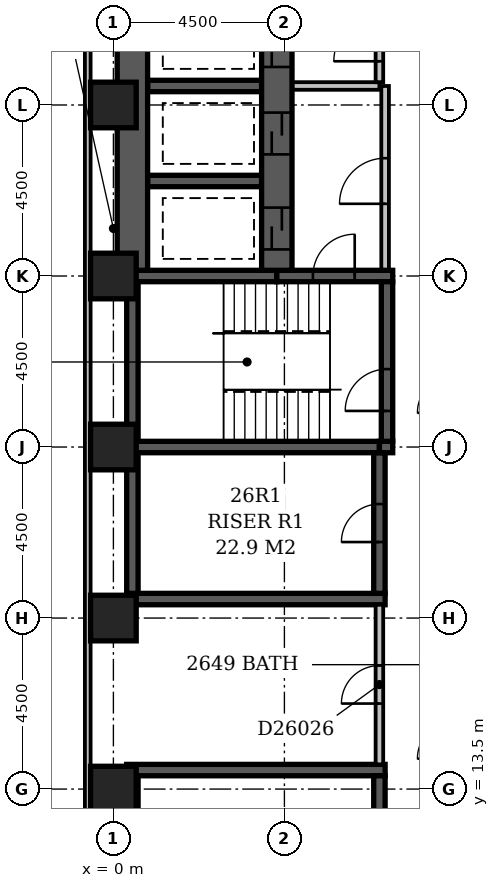
"""IFC4 building model, lengths in metres.
Left out: names, types, materials, properties, quantities, classifications, styles, units other than length and angle.
Written with IfcOpenShell. Run it as: python <this file> out.ifc"""

import sys

from ifc_helpers import new_model, si_unit, direction, frame, frame_2d, origin, origin_2d, place, context, subcontext, project, spatial, rectangle, extrude, element, fill, save


model = new_model("IFC4")
c1 = context("Model", 3, precision=1e-05, world=origin(), true_north=direction((0.0, 1.0)))
c2 = subcontext(c1, "Body", "Model", "MODEL_VIEW")
j1 = project(units=[si_unit("LENGTHUNIT", "METRE"), si_unit("PLANEANGLEUNIT", "RADIAN")], contexts=[c1])
p1 = place(None, origin())
s1 = spatial("IfcSite", under=j1, at=p1, CompositionType="ELEMENT")
p2 = place(p1, origin())
s2 = spatial("IfcBuilding", under=s1, at=p2, CompositionType="ELEMENT")
p3 = place(p2, frame((0.0, 0.0, 104.6)))
s3 = spatial("IfcBuildingStorey", under=s2, at=p3, CompositionType="ELEMENT", Elevation=104.6)
for number, where, z_axis, x_axis in (
    (1, (0.35, 14.0, -0.3), (0.0, 0.0, 1.0), (1.0, 0.0, 0.0)),
    (2, (0.35, 18.5, -0.3), (0.0, 0.0, 1.0), (1.0, 0.0, 0.0)),
):
    element("IfcWall", number, at=place(p3, frame(where, z_axis=z_axis, x_axis=x_axis)), inside=s3, PredefinedType="SHEAR", context=c2, shape_type="SweptSolid", body=[
        extrude(rectangle(XDim=6.8, YDim=0.3, at=frame_2d((3.4, 0.0))), origin(), (0.0, 0.0, 1.0), 3.45),
    ])
p4 = place(p3, frame((0.35, 22.5, -0.3), z_axis=(0.0, 0.0, 1.0), x_axis=(1.0, 0.0, 0.0)))
e3 = element("IfcWall", 3, at=p4, inside=s3, PredefinedType="SHEAR", context=c2, shape_type="SweptSolid", body=[
    extrude(rectangle(XDim=6.65, YDim=0.3, at=frame_2d((3.325, 0.0))), origin(), (0.0, 0.0, 1.0), 3.45),
])
p5 = place(p3, frame((0.35, 27.0, -0.3), z_axis=(0.0, 0.0, 1.0), x_axis=(1.0, 0.0, 0.0)))
e4 = element("IfcWall", 4, at=p5, inside=s3, PredefinedType="SHEAR", context=c2, shape_type="SweptSolid", body=[
    extrude(rectangle(XDim=3.95, YDim=0.3, at=frame_2d((1.975, 0.0))), origin(), (0.0, 0.0, 1.0), 3.45),
])
for number, where, z_axis, x_axis in (
    (5, (0.5, 10.15, -0.3), (0.0, 0.0, 1.0), (0.0, 1.0, 0.0)),
    (6, (0.5, 18.65, -0.3), (0.0, 0.0, 1.0), (0.0, 1.0, 0.0)),
):
    element("IfcWall", number, at=place(p3, frame(where, z_axis=z_axis, x_axis=x_axis)), inside=s3, PredefinedType="SHEAR", context=c2, shape_type="SweptSolid", body=[
        extrude(rectangle(XDim=3.7, YDim=0.3, at=frame_2d((1.85, 0.0))), origin(), (0.0, 0.0, 1.0), 3.45),
    ])
p6 = place(p3, frame((0.5, 22.65, -0.3), z_axis=(0.0, 0.0, 1.0), x_axis=(0.0, 1.0, 0.0)))
e7 = element("IfcWall", 7, at=p6, inside=s3, PredefinedType="SHEAR", context=c2, shape_type="SweptSolid", body=[
    extrude(rectangle(XDim=4.2, YDim=0.3, at=frame_2d((2.1, 0.0))), origin(), (0.0, 0.0, 1.0), 3.45),
])
p7 = place(p3, frame((0.5, 27.15, -0.3), z_axis=(0.0, 0.0, 1.0), x_axis=(0.0, 1.0, 0.0)))
e8 = element("IfcWall", 8, at=p7, inside=s3, PredefinedType="SHEAR", context=c2, shape_type="SweptSolid", body=[
    extrude(rectangle(XDim=6.95, YDim=0.8, at=frame_2d((3.475, 0.0))), origin(), (0.0, 0.0, 1.0), 3.45),
])
for number, where, z_axis, x_axis in (
    (9, (0.9, 29.5, -0.3), (0.0, 0.0, 1.0), (1.0, 0.0, 0.0)),
    (10, (0.9, 32.0, -0.3), (0.0, 0.0, 1.0), (1.0, 0.0, 0.0)),
):
    element("IfcWall", number, at=place(p3, frame(where, z_axis=z_axis, x_axis=x_axis)), inside=s3, PredefinedType="SHEAR", context=c2, shape_type="SweptSolid", body=[
        extrude(rectangle(XDim=3.0, YDim=0.3, at=frame_2d((1.5, 0.0))), origin(), (0.0, 0.0, 1.0), 3.45),
    ])
p8 = place(p3, frame((4.3, 27.0, -0.3), z_axis=(0.0, 0.0, 1.0), x_axis=(1.0, 0.0, 0.0)))
e11 = element("IfcWall", 11, at=p8, inside=s3, PredefinedType="SHEAR", context=c2, shape_type="SweptSolid", body=[
    extrude(rectangle(XDim=3.05, YDim=0.3, at=frame_2d((1.525, 0.0))), origin(), (0.0, 0.0, 1.0), 3.45),
])
p9 = place(p8, frame((0.95, 0.0, 0.3)))
e12 = element("IfcOpeningElement", 12, at=p9, cuts=e11, PredefinedType="OPENING", context=c2, shape_type="SweptSolid", body=[
    extrude(rectangle(XDim=1.1, YDim=2.1, at=frame_2d((0.55, 1.05))), frame((0.0, 0.162, 0.0), z_axis=(0.0, -1.0, 0.0), x_axis=(1.0, 0.0, 0.0)), (0.0, 0.0, 1.0), 0.324),
])
p10 = place(p3, frame((4.3, 27.15, -0.3), z_axis=(0.0, 0.0, 1.0), x_axis=(0.0, 1.0, 0.0)))
e13 = element("IfcWall", 13, at=p10, inside=s3, PredefinedType="SHEAR", context=c2, shape_type="SweptSolid", body=[
    extrude(rectangle(XDim=6.95, YDim=0.8, at=frame_2d((3.475, 0.0))), origin(), (0.0, 0.0, 1.0), 3.45),
])
p11 = place(p10, frame((3.05, 0.0, 0.3)))
e14 = element("IfcOpeningElement", 14, at=p11, cuts=e13, PredefinedType="OPENING", context=c2, shape_type="SweptSolid", body=[
    extrude(rectangle(XDim=1.1, YDim=2.1, at=frame_2d((0.55, 1.05))), frame((0.0, 0.412, 0.0), z_axis=(0.0, -1.0, 0.0), x_axis=(1.0, 0.0, 0.0)), (0.0, 0.0, 1.0), 0.824),
])
p12 = place(p10, frame((0.55, 0.0, 0.3)))
e15 = element("IfcOpeningElement", 15, at=p12, cuts=e13, PredefinedType="OPENING", context=c2, shape_type="SweptSolid", body=[
    extrude(rectangle(XDim=1.1, YDim=2.1, at=frame_2d((0.55, 1.05))), frame((0.0, 0.412, 0.0), z_axis=(0.0, -1.0, 0.0), x_axis=(1.0, 0.0, 0.0)), (0.0, 0.0, 1.0), 0.824),
])
p13 = place(p10, frame((5.35, 0.0, 0.3)))
e16 = element("IfcOpeningElement", 16, at=p13, cuts=e13, PredefinedType="OPENING", context=c2, shape_type="SweptSolid", body=[
    extrude(rectangle(XDim=1.1, YDim=2.1, at=frame_2d((0.55, 1.05))), frame((0.0, 0.412, 0.0), z_axis=(0.0, -1.0, 0.0), x_axis=(1.0, 0.0, 0.0)), (0.0, 0.0, 1.0), 0.824),
])
p14 = place(p3, frame((7.0, 10.15, -0.3), z_axis=(0.0, 0.0, 1.0), x_axis=(0.0, 1.0, 0.0)))
e17 = element("IfcWall", 17, at=p14, inside=s3, PredefinedType="SHEAR", context=c2, shape_type="SweptSolid", body=[
    extrude(rectangle(XDim=3.7, YDim=0.3, at=frame_2d((1.85, 0.0))), origin(), (0.0, 0.0, 1.0), 3.45),
])
p15 = place(p14, frame((1.35, 0.0, 0.3)))
e18 = element("IfcOpeningElement", 18, at=p15, cuts=e17, PredefinedType="OPENING", context=c2, shape_type="SweptSolid", body=[
    extrude(rectangle(XDim=1.0, YDim=2.1, at=frame_2d((0.5, 1.05))), frame((0.0, 0.162, 0.0), z_axis=(0.0, -1.0, 0.0), x_axis=(1.0, 0.0, 0.0)), (0.0, 0.0, 1.0), 0.324),
])
p16 = place(p3, frame((7.0, 18.65, -0.3), z_axis=(0.0, 0.0, 1.0), x_axis=(0.0, 1.0, 0.0)))
e19 = element("IfcWall", 19, at=p16, inside=s3, PredefinedType="SHEAR", context=c2, shape_type="SweptSolid", body=[
    extrude(rectangle(XDim=3.7, YDim=0.3, at=frame_2d((1.85, 0.0))), origin(), (0.0, 0.0, 1.0), 3.45),
])
p17 = place(p16, frame((1.35, 0.0, 0.3)))
e20 = element("IfcOpeningElement", 20, at=p17, cuts=e19, PredefinedType="OPENING", context=c2, shape_type="SweptSolid", body=[
    extrude(rectangle(XDim=1.0, YDim=2.1, at=frame_2d((0.5, 1.05))), frame((0.0, 0.162, 0.0), z_axis=(0.0, -1.0, 0.0), x_axis=(1.0, 0.0, 0.0)), (0.0, 0.0, 1.0), 0.324),
])
p18 = place(p3, frame((7.0, 22.5, -0.3), z_axis=(0.0, 0.0, 1.0), x_axis=(1.0, 0.0, 0.0)))
e21 = element("IfcWall", 21, at=p18, inside=s3, PredefinedType="SHEAR", context=c2, shape_type="SweptSolid", body=[
    extrude(rectangle(XDim=0.35, YDim=0.3, at=frame_2d((0.175, 0.0))), origin(), (0.0, 0.0, 1.0), 3.45),
])
p19 = place(p3, frame((7.2, 22.65, -0.3), z_axis=(0.0, 0.0, 1.0), x_axis=(0.0, 1.0, 0.0)))
e22 = element("IfcWall", 22, at=p19, inside=s3, PredefinedType="SHEAR", context=c2, shape_type="SweptSolid", body=[
    extrude(rectangle(XDim=4.2, YDim=0.3, at=frame_2d((2.1, 0.0))), origin(), (0.0, 0.0, 1.0), 3.45),
])
p20 = place(p19, frame((0.8, 0.0, 0.3)))
e23 = element("IfcOpeningElement", 23, at=p20, cuts=e22, PredefinedType="OPENING", context=c2, shape_type="SweptSolid", body=[
    extrude(rectangle(XDim=1.1, YDim=2.1, at=frame_2d((0.55, 1.05))), frame((0.0, 0.162, 0.0), z_axis=(0.0, -1.0, 0.0), x_axis=(1.0, 0.0, 0.0)), (0.0, 0.0, 1.0), 0.324),
])
for number, where, z_axis, x_axis in (
    (24, (0.0, 13.5, -0.3), (0.0, 0.0, 1.0), (1.0, 0.0, 0.0)),
    (25, (0.0, 18.0, -0.3), (0.0, 0.0, 1.0), (1.0, 0.0, 0.0)),
    (26, (0.0, 22.5, -0.3), (0.0, 0.0, 1.0), (1.0, 0.0, 0.0)),
    (27, (0.0, 27.0, -0.3), (0.0, 0.0, 1.0), (1.0, 0.0, 0.0)),
    (28, (0.0, 31.5, -0.3), (0.0, 0.0, 1.0), (1.0, 0.0, 0.0)),
):
    element("IfcColumn", number, at=place(p3, frame(where, z_axis=z_axis, x_axis=x_axis)), inside=s3, PredefinedType="COLUMN", context=c2, shape_type="SweptSolid", body=[
        extrude(rectangle(XDim=1.2, YDim=1.2, at=origin_2d()), origin(), (0.0, 0.0, 1.0), 3.45),
    ])
p21 = place(p3, frame((-0.675, 59.1, 0.0), z_axis=(0.0, 0.0, 1.0), x_axis=(0.0, -1.0, 0.0)))
e29 = element("IfcWall", 29, at=p21, inside=s3, PredefinedType="STANDARD", context=c2, shape_type="SweptSolid", body=[
    extrude(rectangle(XDim=55.35, YDim=0.15, at=frame_2d((27.675, 0.0))), origin(), (0.0, 0.0, 1.0), 2.5),
])
p22 = place(p21, frame((10.65, 0.0, 0.6)))
e30 = element("IfcOpeningElement", 30, at=p22, cuts=e29, PredefinedType="OPENING", context=c2, shape_type="SweptSolid", body=[
    extrude(rectangle(XDim=2.4, YDim=1.8, at=frame_2d((1.2, 0.9))), frame((0.0, 0.087, 0.0), z_axis=(0.0, -1.0, 0.0), x_axis=(1.0, 0.0, 0.0)), (0.0, 0.0, 1.0), 0.174),
])
p23 = place(p21, frame((15.15, 0.0, 0.6)))
e31 = element("IfcOpeningElement", 31, at=p23, cuts=e29, PredefinedType="OPENING", context=c2, shape_type="SweptSolid", body=[
    extrude(rectangle(XDim=2.4, YDim=1.8, at=frame_2d((1.2, 0.9))), frame((0.0, 0.087, 0.0), z_axis=(0.0, -1.0, 0.0), x_axis=(1.0, 0.0, 0.0)), (0.0, 0.0, 1.0), 0.174),
])
p24 = place(p21, frame((19.434, 0.0, 0.6)))
e32 = element("IfcOpeningElement", 32, at=p24, cuts=e29, PredefinedType="OPENING", context=c2, shape_type="SweptSolid", body=[
    extrude(rectangle(XDim=0.6, YDim=1.8, at=frame_2d((0.3, 0.9))), frame((0.0, 0.087, 0.0), z_axis=(0.0, -1.0, 0.0), x_axis=(1.0, 0.0, 0.0)), (0.0, 0.0, 1.0), 0.174),
])
p25 = place(p21, frame((21.692, 0.0, 0.6)))
e33 = element("IfcOpeningElement", 33, at=p25, cuts=e29, PredefinedType="OPENING", context=c2, shape_type="SweptSolid", body=[
    extrude(rectangle(XDim=0.6, YDim=1.8, at=frame_2d((0.3, 0.9))), frame((0.0, 0.087, 0.0), z_axis=(0.0, -1.0, 0.0), x_axis=(1.0, 0.0, 0.0)), (0.0, 0.0, 1.0), 0.174),
])
p26 = place(p3, frame((4.72, 32.0, 0.0), z_axis=(0.0, 0.0, 1.0), x_axis=(1.0, 0.0, 0.0)))
e34 = element("IfcWall", 34, at=p26, inside=s3, PredefinedType="PARTITIONING", context=c2, shape_type="SweptSolid", body=[
    extrude(rectangle(XDim=2.28, YDim=0.2, at=frame_2d((1.14, 0.0))), origin(), (0.0, 0.0, 1.0), 3.15),
])
p27 = place(p3, frame((7.0, 32.1, 0.0), z_axis=(0.0, 0.0, 1.0), x_axis=(0.0, 1.0, 0.0)))
e35 = element("IfcWall", 35, at=p27, inside=s3, PredefinedType="PARTITIONING", context=c2, shape_type="SweptSolid", body=[
    extrude(rectangle(XDim=2.4, YDim=0.2, at=frame_2d((1.2, 0.0))), origin(), (0.0, 0.0, 1.0), 3.15),
])
p28 = place(p27, frame((0.55, 0.0, 0.0)))
e36 = element("IfcOpeningElement", 36, at=p28, cuts=e35, PredefinedType="OPENING", context=c2, shape_type="SweptSolid", body=[
    extrude(rectangle(XDim=1.2, YDim=2.1, at=frame_2d((0.6, 1.05))), frame((0.0, 0.112, 0.0), z_axis=(0.0, -1.0, 0.0), x_axis=(1.0, 0.0, 0.0)), (0.0, 0.0, 1.0), 0.224),
])
p29 = place(p3, frame((7.15, 27.17, 0.0), z_axis=(0.0, 0.0, 1.0), x_axis=(0.0, 1.0, 0.0)))
e37 = element("IfcWall", 37, at=p29, inside=s3, PredefinedType="PARTITIONING", context=c2, shape_type="SweptSolid", body=[
    extrude(rectangle(XDim=4.83, YDim=0.2, at=frame_2d((2.415, 0.0))), origin(), (0.0, 0.0, 1.0), 3.15),
])
p30 = place(p29, frame((1.73, 0.0, 0.0)))
e38 = element("IfcOpeningElement", 38, at=p30, cuts=e37, PredefinedType="OPENING", context=c2, shape_type="SweptSolid", body=[
    extrude(rectangle(XDim=1.2, YDim=2.1, at=frame_2d((0.6, 1.05))), frame((0.0, 0.112, 0.0), z_axis=(0.0, -1.0, 0.0), x_axis=(1.0, 0.0, 0.0)), (0.0, 0.0, 1.0), 0.224),
])
p31 = place(p3, frame((7.0, 14.15, 0.0), z_axis=(0.0, 0.0, 1.0), x_axis=(0.0, 1.0, 0.0)))
e39 = element("IfcWall", 39, at=p31, inside=s3, PredefinedType="PARTITIONING", context=c2, shape_type="SweptSolid", body=[
    extrude(rectangle(XDim=4.2, YDim=0.2, at=frame_2d((2.1, 0.0))), origin(), (0.0, 0.0, 1.0), 3.15),
])
p32 = place(p31, frame((1.6, 0.0, 0.0)))
e40 = element("IfcOpeningElement", 40, at=p32, cuts=e39, PredefinedType="OPENING", context=c2, shape_type="SweptSolid", body=[
    extrude(rectangle(XDim=1.0, YDim=2.1, at=frame_2d((0.5, 1.05))), frame((0.0, 0.112, 0.0), z_axis=(0.0, -1.0, 0.0), x_axis=(1.0, 0.0, 0.0)), (0.0, 0.0, 1.0), 0.224),
])
p33 = place(p30, origin())
e41 = element("IfcDoor", 41, at=p33, inside=s3, OperationType="SINGLE_SWING_LEFT", PredefinedType="DOOR", context=c2, shape_type="SweptSolid", body=[
    extrude(rectangle(XDim=1.2, YDim=2.1, at=frame_2d((0.6, 1.05))), frame((0.0, 0.025, 0.0), z_axis=(0.0, -1.0, 0.0), x_axis=(1.0, 0.0, 0.0)), (0.0, 0.0, 1.0), 0.05),
])
fill(e38, e41)
p34 = place(p11, origin())
e42 = element("IfcDoor", 42, at=p34, inside=s3, OperationType="SLIDING_TO_LEFT", PredefinedType="DOOR", context=c2, shape_type="SweptSolid", body=[
    extrude(rectangle(XDim=1.1, YDim=2.1, at=frame_2d((0.55, 1.05))), frame((0.0, 0.025, 0.0), z_axis=(0.0, -1.0, 0.0), x_axis=(1.0, 0.0, 0.0)), (0.0, 0.0, 1.0), 0.05),
])
fill(e14, e42)
p35 = place(p12, origin())
e43 = element("IfcDoor", 43, at=p35, inside=s3, OperationType="SLIDING_TO_LEFT", PredefinedType="DOOR", context=c2, shape_type="SweptSolid", body=[
    extrude(rectangle(XDim=1.1, YDim=2.1, at=frame_2d((0.55, 1.05))), frame((0.0, 0.025, 0.0), z_axis=(0.0, -1.0, 0.0), x_axis=(1.0, 0.0, 0.0)), (0.0, 0.0, 1.0), 0.05),
])
fill(e15, e43)
p36 = place(p28, origin())
e44 = element("IfcDoor", 44, at=p36, inside=s3, OperationType="SINGLE_SWING_LEFT", PredefinedType="DOOR", context=c2, shape_type="SweptSolid", body=[
    extrude(rectangle(XDim=1.2, YDim=2.1, at=frame_2d((0.6, 1.05))), frame((0.0, 0.025, 0.0), z_axis=(0.0, -1.0, 0.0), x_axis=(1.0, 0.0, 0.0)), (0.0, 0.0, 1.0), 0.05),
])
fill(e36, e44)
p37 = place(p13, origin())
e45 = element("IfcDoor", 45, at=p37, inside=s3, OperationType="SLIDING_TO_LEFT", PredefinedType="DOOR", context=c2, shape_type="SweptSolid", body=[
    extrude(rectangle(XDim=1.1, YDim=2.1, at=frame_2d((0.55, 1.05))), frame((0.0, 0.025, 0.0), z_axis=(0.0, -1.0, 0.0), x_axis=(1.0, 0.0, 0.0)), (0.0, 0.0, 1.0), 0.05),
])
fill(e16, e45)
p38 = place(p17, origin())
e46 = element("IfcDoor", 46, at=p38, inside=s3, OperationType="SINGLE_SWING_LEFT", PredefinedType="DOOR", context=c2, shape_type="SweptSolid", body=[
    extrude(rectangle(XDim=1.0, YDim=2.1, at=frame_2d((0.5, 1.05))), frame((0.0, 0.025, 0.0), z_axis=(0.0, -1.0, 0.0), x_axis=(1.0, 0.0, 0.0)), (0.0, 0.0, 1.0), 0.05),
])
fill(e20, e46)
p39 = place(p9, frame((1.1, 0.0, 0.0), z_axis=(0.0, 0.0, 1.0), x_axis=(-1.0, 0.0, 0.0)))
e47 = element("IfcDoor", 47, at=p39, inside=s3, OperationType="SINGLE_SWING_LEFT", PredefinedType="DOOR", context=c2, shape_type="SweptSolid", body=[
    extrude(rectangle(XDim=1.1, YDim=2.1, at=frame_2d((0.55, 1.05))), frame((0.0, 0.025, 0.0), z_axis=(0.0, -1.0, 0.0), x_axis=(1.0, 0.0, 0.0)), (0.0, 0.0, 1.0), 0.05),
])
fill(e12, e47)
p40 = place(p20, origin())
e48 = element("IfcDoor", 48, at=p40, inside=s3, OperationType="SINGLE_SWING_LEFT", PredefinedType="DOOR", context=c2, shape_type="SweptSolid", body=[
    extrude(rectangle(XDim=1.1, YDim=2.1, at=frame_2d((0.55, 1.05))), frame((0.0, 0.025, 0.0), z_axis=(0.0, -1.0, 0.0), x_axis=(1.0, 0.0, 0.0)), (0.0, 0.0, 1.0), 0.05),
])
fill(e23, e48)
p41 = place(p32, origin())
e49 = element("IfcDoor", 49, at=p41, inside=s3, OperationType="SINGLE_SWING_LEFT", PredefinedType="DOOR", context=c2, shape_type="SweptSolid", body=[
    extrude(rectangle(XDim=1.0, YDim=2.1, at=frame_2d((0.5, 1.05))), frame((0.0, 0.025, 0.0), z_axis=(0.0, -1.0, 0.0), x_axis=(1.0, 0.0, 0.0)), (0.0, 0.0, 1.0), 0.05),
])
fill(e40, e49)
save(model, sys.argv[1])
